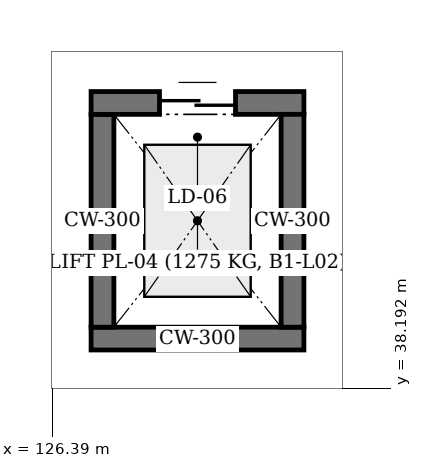
"""IFC4 building model, lengths in metres.
Left out: names, types, materials, properties, quantities, classifications, styles, units other than length and angle.
Written with IfcOpenShell. Run it as: python <this file> out.ifc"""

import sys

from ifc_helpers import new_model, si_unit, direction, frame, frame_2d, origin, place, context, subcontext, project, spatial, rectangle, extrude, element, fill, save


model = new_model("IFC4")
c1 = context("Model", 3, precision=1e-05, world=origin(), true_north=direction((0.0, 1.0)))
c2 = subcontext(c1, "Body", "Model", "MODEL_VIEW")
j1 = project(units=[si_unit("LENGTHUNIT", "METRE"), si_unit("PLANEANGLEUNIT", "RADIAN")], contexts=[c1])
p1 = place(None, origin())
s1 = spatial("IfcSite", under=j1, at=p1, CompositionType="ELEMENT")
p2 = place(p1, origin())
s2 = spatial("IfcBuilding", under=s1, at=p2, CompositionType="ELEMENT")
p3 = place(p2, origin())
s3 = spatial("IfcBuildingStorey", under=s2, at=p3, CompositionType="ELEMENT", Elevation=0.0)
for number, where, z_axis, x_axis in (
    (1, (129.7, 38.85, 0.0), (0.0, 0.0, 1.0), (-1.0, 0.0, 0.0)),
    (2, (127.05, 39.0, 0.0), (0.0, 0.0, 1.0), (0.0, 1.0, 0.0)),
):
    element("IfcWall", number, at=place(p3, frame(where, z_axis=z_axis, x_axis=x_axis)), inside=s3, PredefinedType="SOLIDWALL", context=c2, shape_type="SweptSolid", body=[
        extrude(rectangle(XDim=2.8, YDim=0.3, at=frame_2d((1.4, 0.0))), origin(), (0.0, 0.0, 1.0), 4.8),
    ])
p4 = place(p3, frame((126.9, 41.95, 0.0), z_axis=(0.0, 0.0, 1.0), x_axis=(1.0, 0.0, 0.0)))
e3 = element("IfcWall", 3, at=p4, inside=s3, PredefinedType="SOLIDWALL", context=c2, shape_type="SweptSolid", body=[
    extrude(rectangle(XDim=2.8, YDim=0.3, at=frame_2d((1.4, 0.0))), origin(), (0.0, 0.0, 1.0), 4.8),
])
p5 = place(p4, frame((0.9, 0.0, 0.0)))
e4 = element("IfcOpeningElement", 4, at=p5, cuts=e3, PredefinedType="OPENING", context=c2, shape_type="SweptSolid", body=[
    extrude(rectangle(XDim=1.0, YDim=2.15, at=frame_2d((0.5, 1.075))), frame((0.0, 0.17, 0.0), z_axis=(0.0, -1.0, 0.0), x_axis=(1.0, 0.0, 0.0)), (0.0, 0.0, 1.0), 0.34),
])
p6 = place(p3, frame((129.55, 41.8, 0.0), z_axis=(0.0, 0.0, 1.0), x_axis=(0.0, -1.0, 0.0)))
e5 = element("IfcWall", 5, at=p6, inside=s3, PredefinedType="SOLIDWALL", context=c2, shape_type="SweptSolid", body=[
    extrude(rectangle(XDim=2.8, YDim=0.3, at=frame_2d((1.4, 0.0))), origin(), (0.0, 0.0, 1.0), 4.8),
])
p7 = place(p5, origin())
e6 = element("IfcDoor", 6, at=p7, inside=s3, OperationType="DOUBLE_DOOR_SLIDING", PredefinedType="DOOR", context=c2, shape_type="SweptSolid", body=[
    extrude(rectangle(XDim=1.0, YDim=2.15, at=frame_2d((0.5, 1.075))), frame((0.0, 0.025, 0.0), z_axis=(0.0, -1.0, 0.0), x_axis=(1.0, 0.0, 0.0)), (0.0, 0.0, 1.0), 0.05),
])
fill(e4, e6)
save(model, sys.argv[1])
